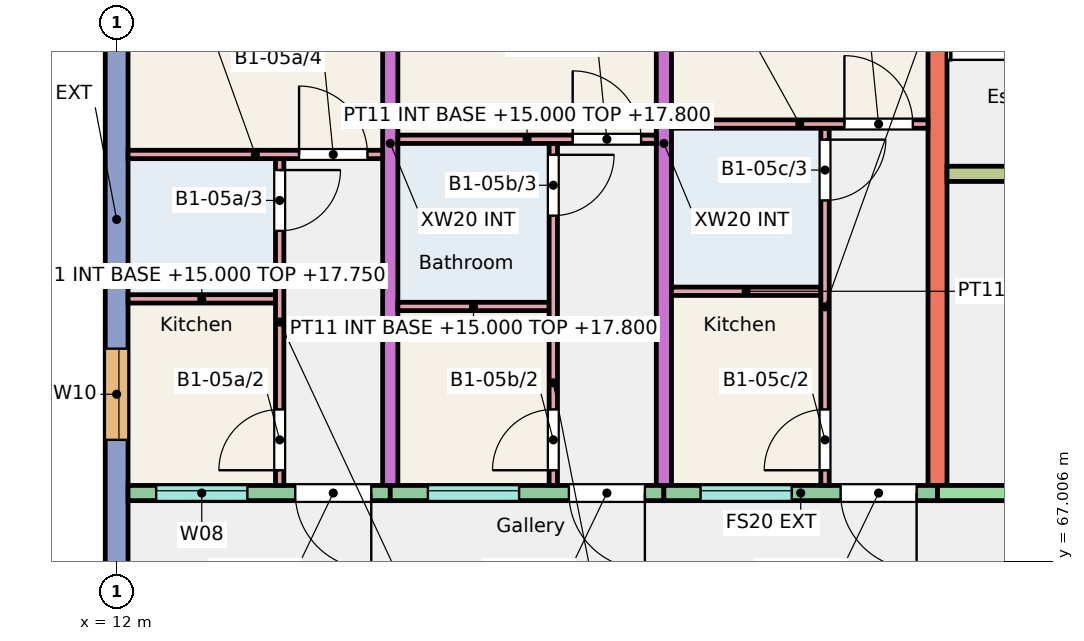
"""IFC4 building model, lengths in metres.
Left out: names, types, materials, properties, quantities, classifications, styles, units other than length and angle.
Written with IfcOpenShell. Run it as: python <this file> out.ifc"""

import sys

from ifc_helpers import new_model, si_unit, direction, frame, frame_2d, origin, place, context, subcontext, project, spatial, rectangle, extrude, element, fill, save


model = new_model("IFC4")
c1 = context("Model", 3, precision=1e-05, world=origin(), true_north=direction((0.0, 1.0)))
c2 = subcontext(c1, "Body", "Model", "MODEL_VIEW")
j1 = project(units=[si_unit("LENGTHUNIT", "METRE"), si_unit("PLANEANGLEUNIT", "RADIAN")], contexts=[c1])
p1 = place(None, origin())
s1 = spatial("IfcSite", under=j1, at=p1, CompositionType="ELEMENT")
p2 = place(p1, origin())
s2 = spatial("IfcBuilding", under=s1, at=p2, CompositionType="ELEMENT")
p3 = place(p2, frame((0.0, 0.0, 15.0)))
s3 = spatial("IfcBuildingStorey", under=s2, at=p3, CompositionType="ELEMENT", Elevation=15.0)
p4 = place(p3, frame((12.0, 66.0, 0.0), z_axis=(0.0, 0.0, 1.0), x_axis=(0.0, 1.0, 0.0)))
e1 = element("IfcWall", 1, at=p4, inside=s3, PredefinedType="SHEAR", context=c2, shape_type="SweptSolid", body=[
    extrude(rectangle(XDim=11.0, YDim=0.3, at=frame_2d((5.5, 0.0))), origin(), (0.0, 0.0, 1.0), 3.0),
])
p5 = place(p4, frame((2.6, 0.0, 0.9)))
e2 = element("IfcOpeningElement", 2, at=p5, cuts=e1, PredefinedType="OPENING", context=c2, shape_type="SweptSolid", body=[
    extrude(rectangle(XDim=1.2, YDim=1.5, at=frame_2d((0.6, 0.75))), frame((0.0, 0.16, 0.0), z_axis=(0.0, -1.0, 0.0), x_axis=(1.0, 0.0, 0.0)), (0.0, 0.0, 1.0), 0.32),
])
p6 = place(p4, frame((7.805, 0.0, 0.9)))
e3 = element("IfcOpeningElement", 3, at=p6, cuts=e1, PredefinedType="OPENING", context=c2, shape_type="SweptSolid", body=[
    extrude(rectangle(XDim=1.8, YDim=1.5, at=frame_2d((0.9, 0.75))), frame((0.0, 0.16, 0.0), z_axis=(0.0, -1.0, 0.0), x_axis=(1.0, 0.0, 0.0)), (0.0, 0.0, 1.0), 0.32),
])
for number, where, z_axis, x_axis in (
    (4, (15.6, 68.0, 0.0), (0.0, 0.0, 1.0), (0.0, 1.0, 0.0)),
    (5, (19.2, 68.0, 0.0), (0.0, 0.0, 1.0), (0.0, 1.0, 0.0)),
):
    element("IfcWall", number, at=place(p3, frame(where, z_axis=z_axis, x_axis=x_axis)), inside=s3, PredefinedType="SHEAR", context=c2, shape_type="SweptSolid", body=[
        extrude(rectangle(XDim=9.0, YDim=0.2, at=frame_2d((4.5, 0.0))), origin(), (0.0, 0.0, 1.0), 3.0),
    ])
p7 = place(p3, frame((22.8, 68.0, 0.0), z_axis=(0.0, 0.0, 1.0), x_axis=(0.0, 1.0, 0.0)))
e6 = element("IfcWall", 6, at=p7, inside=s3, PredefinedType="SHEAR", context=c2, shape_type="SweptSolid", body=[
    extrude(rectangle(XDim=9.0, YDim=0.25, at=frame_2d((4.5, 0.0))), origin(), (0.0, 0.0, 1.0), 3.0),
])
p8 = place(p3, frame((12.15, 67.9, 0.0), z_axis=(0.0, 0.0, 1.0), x_axis=(1.0, 0.0, 0.0)))
e7 = element("IfcWall", 7, at=p8, inside=s3, PredefinedType="SOLIDWALL", context=c2, shape_type="SweptSolid", body=[
    extrude(rectangle(XDim=3.45, YDim=0.2, at=frame_2d((1.725, 0.0))), origin(), (0.0, 0.0, 1.0), 3.0),
])
p9 = place(p8, frame((0.37, 0.0, 1.1)))
e8 = element("IfcOpeningElement", 8, at=p9, cuts=e7, PredefinedType="OPENING", context=c2, shape_type="SweptSolid", body=[
    extrude(rectangle(XDim=1.2, YDim=1.3, at=frame_2d((0.6, 0.65))), frame((0.0, 0.11, 0.0), z_axis=(0.0, -1.0, 0.0), x_axis=(1.0, 0.0, 0.0)), (0.0, 0.0, 1.0), 0.22),
])
p10 = place(p8, frame((2.2, 0.0, 0.0)))
e9 = element("IfcOpeningElement", 9, at=p10, cuts=e7, PredefinedType="OPENING", context=c2, shape_type="SweptSolid", body=[
    extrude(rectangle(XDim=1.0, YDim=2.1, at=frame_2d((0.5, 1.05))), frame((0.0, 0.11, 0.0), z_axis=(0.0, -1.0, 0.0), x_axis=(1.0, 0.0, 0.0)), (0.0, 0.0, 1.0), 0.22),
])
p11 = place(p3, frame((15.6, 67.9, 0.0), z_axis=(0.0, 0.0, 1.0), x_axis=(1.0, 0.0, 0.0)))
e10 = element("IfcWall", 10, at=p11, inside=s3, PredefinedType="SOLIDWALL", context=c2, shape_type="SweptSolid", body=[
    extrude(rectangle(XDim=3.6, YDim=0.2, at=frame_2d((1.8, 0.0))), origin(), (0.0, 0.0, 1.0), 3.0),
])
p12 = place(p11, frame((0.495, 0.0, 1.1)))
e11 = element("IfcOpeningElement", 11, at=p12, cuts=e10, PredefinedType="OPENING", context=c2, shape_type="SweptSolid", body=[
    extrude(rectangle(XDim=1.2, YDim=1.3, at=frame_2d((0.6, 0.65))), frame((0.0, 0.11, 0.0), z_axis=(0.0, -1.0, 0.0), x_axis=(1.0, 0.0, 0.0)), (0.0, 0.0, 1.0), 0.22),
])
p13 = place(p11, frame((2.35, 0.0, 0.0)))
e12 = element("IfcOpeningElement", 12, at=p13, cuts=e10, PredefinedType="OPENING", context=c2, shape_type="SweptSolid", body=[
    extrude(rectangle(XDim=1.0, YDim=2.1, at=frame_2d((0.5, 1.05))), frame((0.0, 0.11, 0.0), z_axis=(0.0, -1.0, 0.0), x_axis=(1.0, 0.0, 0.0)), (0.0, 0.0, 1.0), 0.22),
])
p14 = place(p3, frame((19.2, 67.9, 0.0), z_axis=(0.0, 0.0, 1.0), x_axis=(1.0, 0.0, 0.0)))
e13 = element("IfcWall", 13, at=p14, inside=s3, PredefinedType="SOLIDWALL", context=c2, shape_type="SweptSolid", body=[
    extrude(rectangle(XDim=3.6, YDim=0.2, at=frame_2d((1.8, 0.0))), origin(), (0.0, 0.0, 1.0), 3.0),
])
p15 = place(p14, frame((0.482, 0.0, 1.1)))
e14 = element("IfcOpeningElement", 14, at=p15, cuts=e13, PredefinedType="OPENING", context=c2, shape_type="SweptSolid", body=[
    extrude(rectangle(XDim=1.2, YDim=1.3, at=frame_2d((0.6, 0.65))), frame((0.0, 0.11, 0.0), z_axis=(0.0, -1.0, 0.0), x_axis=(1.0, 0.0, 0.0)), (0.0, 0.0, 1.0), 0.22),
])
p16 = place(p14, frame((2.325, 0.0, 0.0)))
e15 = element("IfcOpeningElement", 15, at=p16, cuts=e13, PredefinedType="OPENING", context=c2, shape_type="SweptSolid", body=[
    extrude(rectangle(XDim=1.0, YDim=2.1, at=frame_2d((0.5, 1.05))), frame((0.0, 0.11, 0.0), z_axis=(0.0, -1.0, 0.0), x_axis=(1.0, 0.0, 0.0)), (0.0, 0.0, 1.0), 0.22),
])
p17 = place(p3, frame((22.8, 67.9, 0.0), z_axis=(0.0, 0.0, 1.0), x_axis=(1.0, 0.0, 0.0)))
e16 = element("IfcWall", 16, at=p17, inside=s3, PredefinedType="SHEAR", context=c2, shape_type="SweptSolid", body=[
    extrude(rectangle(XDim=5.85, YDim=0.2, at=frame_2d((2.925, 0.0))), origin(), (0.0, 0.0, 1.0), 3.0),
])
p18 = place(p17, frame((2.438, 0.0, 0.0)))
e17 = element("IfcOpeningElement", 17, at=p18, cuts=e16, PredefinedType="OPENING", context=c2, shape_type="SweptSolid", body=[
    extrude(rectangle(XDim=1.1, YDim=2.1, at=frame_2d((0.55, 1.05))), frame((0.0, 0.11, 0.0), z_axis=(0.0, -1.0, 0.0), x_axis=(1.0, 0.0, 0.0)), (0.0, 0.0, 1.0), 0.22),
])
p19 = place(p3, frame((22.925, 72.1, 0.0), z_axis=(0.0, 0.0, 1.0), x_axis=(1.0, 0.0, 0.0)))
e18 = element("IfcWall", 18, at=p19, inside=s3, PredefinedType="SHEAR", context=c2, shape_type="SweptSolid", body=[
    extrude(rectangle(XDim=5.725, YDim=0.2, at=frame_2d((2.862, 0.0))), origin(), (0.0, 0.0, 1.0), 3.0),
])
p20 = place(p19, frame((0.95, 0.0, 0.0)))
e19 = element("IfcOpeningElement", 19, at=p20, cuts=e18, PredefinedType="OPENING", context=c2, shape_type="SweptSolid", body=[
    extrude(rectangle(XDim=1.0, YDim=2.1, at=frame_2d((0.5, 1.05))), frame((0.0, 0.11, 0.0), z_axis=(0.0, -1.0, 0.0), x_axis=(1.0, 0.0, 0.0)), (0.0, 0.0, 1.0), 0.22),
])
p21 = place(p19, frame((3.863, 0.0, 0.0)))
e20 = element("IfcOpeningElement", 20, at=p21, cuts=e18, PredefinedType="OPENING", context=c2, shape_type="SweptSolid", body=[
    extrude(rectangle(XDim=1.1, YDim=2.1, at=frame_2d((0.55, 1.05))), frame((0.0, 0.11, 0.0), z_axis=(0.0, -1.0, 0.0), x_axis=(1.0, 0.0, 0.0)), (0.0, 0.0, 1.0), 0.22),
])
p22 = place(p3, frame((12.15, 70.455, 0.0), z_axis=(0.0, 0.0, 1.0), x_axis=(1.0, 0.0, 0.0)))
e21 = element("IfcWall", 21, at=p22, inside=s3, PredefinedType="PARTITIONING", context=c2, shape_type="SweptSolid", body=[
    extrude(rectangle(XDim=1.94, YDim=0.11, at=frame_2d((0.97, 0.0))), origin(), (0.0, 0.0, 1.0), 2.75),
])
p23 = place(p3, frame((14.145, 68.0, 0.0), z_axis=(0.0, 0.0, 1.0), x_axis=(0.0, 1.0, 0.0)))
e22 = element("IfcWall", 22, at=p23, inside=s3, PredefinedType="PARTITIONING", context=c2, shape_type="SweptSolid", body=[
    extrude(rectangle(XDim=4.3, YDim=0.11, at=frame_2d((2.15, 0.0))), origin(), (0.0, 0.0, 1.0), 2.75),
])
p24 = place(p23, frame((0.2, 0.0, 0.0)))
e23 = element("IfcOpeningElement", 23, at=p24, cuts=e22, PredefinedType="OPENING", context=c2, shape_type="SweptSolid", body=[
    extrude(rectangle(XDim=0.8, YDim=2.1, at=frame_2d((0.4, 1.05))), frame((0.0, 0.065, 0.0), z_axis=(0.0, -1.0, 0.0), x_axis=(1.0, 0.0, 0.0)), (0.0, 0.0, 1.0), 0.13),
])
p25 = place(p23, frame((3.35, 0.0, 0.0)))
e24 = element("IfcOpeningElement", 24, at=p25, cuts=e22, PredefinedType="OPENING", context=c2, shape_type="SweptSolid", body=[
    extrude(rectangle(XDim=0.8, YDim=2.1, at=frame_2d((0.4, 1.05))), frame((0.0, 0.065, 0.0), z_axis=(0.0, -1.0, 0.0), x_axis=(1.0, 0.0, 0.0)), (0.0, 0.0, 1.0), 0.13),
])
p26 = place(p3, frame((12.15, 72.355, 0.0), z_axis=(0.0, 0.0, 1.0), x_axis=(1.0, 0.0, 0.0)))
e25 = element("IfcWall", 25, at=p26, inside=s3, PredefinedType="PARTITIONING", context=c2, shape_type="SweptSolid", body=[
    extrude(rectangle(XDim=3.35, YDim=0.11, at=frame_2d((1.675, 0.0))), origin(), (0.0, 0.0, 1.0), 2.75),
])
p27 = place(p26, frame((2.25, 0.0, 0.0)))
e26 = element("IfcOpeningElement", 26, at=p27, cuts=e25, PredefinedType="OPENING", context=c2, shape_type="SweptSolid", body=[
    extrude(rectangle(XDim=0.9, YDim=2.1, at=frame_2d((0.45, 1.05))), frame((0.0, 0.065, 0.0), z_axis=(0.0, -1.0, 0.0), x_axis=(1.0, 0.0, 0.0)), (0.0, 0.0, 1.0), 0.13),
])
p28 = place(p3, frame((15.7, 70.355, 0.0), z_axis=(0.0, 0.0, 1.0), x_axis=(1.0, 0.0, 0.0)))
e27 = element("IfcWall", 27, at=p28, inside=s3, PredefinedType="PARTITIONING", context=c2, shape_type="SweptSolid", body=[
    extrude(rectangle(XDim=1.99, YDim=0.11, at=frame_2d((0.995, 0.0))), origin(), (0.0, 0.0, 1.0), 2.8),
])
p29 = place(p3, frame((17.745, 68.0, 0.0), z_axis=(0.0, 0.0, 1.0), x_axis=(0.0, 1.0, 0.0)))
e28 = element("IfcWall", 28, at=p29, inside=s3, PredefinedType="PARTITIONING", context=c2, shape_type="SweptSolid", body=[
    extrude(rectangle(XDim=4.5, YDim=0.11, at=frame_2d((2.25, 0.0))), origin(), (0.0, 0.0, 1.0), 2.8),
])
p30 = place(p29, frame((0.2, 0.0, 0.0)))
e29 = element("IfcOpeningElement", 29, at=p30, cuts=e28, PredefinedType="OPENING", context=c2, shape_type="SweptSolid", body=[
    extrude(rectangle(XDim=0.8, YDim=2.1, at=frame_2d((0.4, 1.05))), frame((0.0, 0.065, 0.0), z_axis=(0.0, -1.0, 0.0), x_axis=(1.0, 0.0, 0.0)), (0.0, 0.0, 1.0), 0.13),
])
p31 = place(p29, frame((3.55, 0.0, 0.0)))
e30 = element("IfcOpeningElement", 30, at=p31, cuts=e28, PredefinedType="OPENING", context=c2, shape_type="SweptSolid", body=[
    extrude(rectangle(XDim=0.8, YDim=2.1, at=frame_2d((0.4, 1.05))), frame((0.0, 0.065, 0.0), z_axis=(0.0, -1.0, 0.0), x_axis=(1.0, 0.0, 0.0)), (0.0, 0.0, 1.0), 0.13),
])
p32 = place(p3, frame((15.7, 72.555, 0.0), z_axis=(0.0, 0.0, 1.0), x_axis=(1.0, 0.0, 0.0)))
e31 = element("IfcWall", 31, at=p32, inside=s3, PredefinedType="PARTITIONING", context=c2, shape_type="SweptSolid", body=[
    extrude(rectangle(XDim=3.4, YDim=0.11, at=frame_2d((1.7, 0.0))), origin(), (0.0, 0.0, 1.0), 2.8),
])
p33 = place(p32, frame((2.3, 0.0, 0.0)))
e32 = element("IfcOpeningElement", 32, at=p33, cuts=e31, PredefinedType="OPENING", context=c2, shape_type="SweptSolid", body=[
    extrude(rectangle(XDim=0.9, YDim=2.1, at=frame_2d((0.45, 1.05))), frame((0.0, 0.065, 0.0), z_axis=(0.0, -1.0, 0.0), x_axis=(1.0, 0.0, 0.0)), (0.0, 0.0, 1.0), 0.13),
])
p34 = place(p3, frame((19.3, 70.555, 0.0), z_axis=(0.0, 0.0, 1.0), x_axis=(1.0, 0.0, 0.0)))
e33 = element("IfcWall", 33, at=p34, inside=s3, PredefinedType="PARTITIONING", context=c2, shape_type="SweptSolid", body=[
    extrude(rectangle(XDim=1.965, YDim=0.11, at=frame_2d((0.982, 0.0))), origin(), (0.0, 0.0, 1.0), 2.8),
])
p35 = place(p3, frame((21.32, 68.0, 0.0), z_axis=(0.0, 0.0, 1.0), x_axis=(0.0, 1.0, 0.0)))
e34 = element("IfcWall", 34, at=p35, inside=s3, PredefinedType="PARTITIONING", context=c2, shape_type="SweptSolid", body=[
    extrude(rectangle(XDim=4.7, YDim=0.11, at=frame_2d((2.35, 0.0))), origin(), (0.0, 0.0, 1.0), 2.8),
])
p36 = place(p35, frame((0.2, 0.0, 0.0)))
e35 = element("IfcOpeningElement", 35, at=p36, cuts=e34, PredefinedType="OPENING", context=c2, shape_type="SweptSolid", body=[
    extrude(rectangle(XDim=0.8, YDim=2.1, at=frame_2d((0.4, 1.05))), frame((0.0, 0.065, 0.0), z_axis=(0.0, -1.0, 0.0), x_axis=(1.0, 0.0, 0.0)), (0.0, 0.0, 1.0), 0.13),
])
p37 = place(p35, frame((3.75, 0.0, 0.0)))
e36 = element("IfcOpeningElement", 36, at=p37, cuts=e34, PredefinedType="OPENING", context=c2, shape_type="SweptSolid", body=[
    extrude(rectangle(XDim=0.8, YDim=2.1, at=frame_2d((0.4, 1.05))), frame((0.0, 0.065, 0.0), z_axis=(0.0, -1.0, 0.0), x_axis=(1.0, 0.0, 0.0)), (0.0, 0.0, 1.0), 0.13),
])
p38 = place(p3, frame((19.3, 72.755, 0.0), z_axis=(0.0, 0.0, 1.0), x_axis=(1.0, 0.0, 0.0)))
e37 = element("IfcWall", 37, at=p38, inside=s3, PredefinedType="PARTITIONING", context=c2, shape_type="SweptSolid", body=[
    extrude(rectangle(XDim=3.375, YDim=0.11, at=frame_2d((1.688, 0.0))), origin(), (0.0, 0.0, 1.0), 2.8),
])
p39 = place(p38, frame((2.275, 0.0, 0.0)))
e38 = element("IfcOpeningElement", 38, at=p39, cuts=e37, PredefinedType="OPENING", context=c2, shape_type="SweptSolid", body=[
    extrude(rectangle(XDim=0.9, YDim=2.1, at=frame_2d((0.45, 1.05))), frame((0.0, 0.065, 0.0), z_axis=(0.0, -1.0, 0.0), x_axis=(1.0, 0.0, 0.0)), (0.0, 0.0, 1.0), 0.13),
])
p40 = place(p9, origin())
e39 = element("IfcWindow", 39, at=p40, inside=s3, PartitioningType="SINGLE_PANEL", PredefinedType="WINDOW", context=c2, shape_type="SweptSolid", body=[
    extrude(rectangle(XDim=1.2, YDim=1.3, at=frame_2d((0.6, 0.65))), frame((0.0, 0.06, 0.0), z_axis=(0.0, -1.0, 0.0), x_axis=(1.0, 0.0, 0.0)), (0.0, 0.0, 1.0), 0.06),
])
fill(e8, e39)
p41 = place(p5, origin())
e40 = element("IfcWindow", 40, at=p41, inside=s3, PartitioningType="SINGLE_PANEL", PredefinedType="WINDOW", context=c2, shape_type="SweptSolid", body=[
    extrude(rectangle(XDim=1.2, YDim=1.5, at=frame_2d((0.6, 0.75))), frame((0.0, 0.0, 0.0), z_axis=(0.0, -1.0, 0.0), x_axis=(1.0, 0.0, 0.0)), (0.0, 0.0, 1.0), 0.06),
])
fill(e2, e40)
p42 = place(p12, origin())
e41 = element("IfcWindow", 41, at=p42, inside=s3, PartitioningType="SINGLE_PANEL", PredefinedType="WINDOW", context=c2, shape_type="SweptSolid", body=[
    extrude(rectangle(XDim=1.2, YDim=1.3, at=frame_2d((0.6, 0.65))), frame((0.0, 0.06, 0.0), z_axis=(0.0, -1.0, 0.0), x_axis=(1.0, 0.0, 0.0)), (0.0, 0.0, 1.0), 0.06),
])
fill(e11, e41)
p43 = place(p15, origin())
e42 = element("IfcWindow", 42, at=p43, inside=s3, PartitioningType="SINGLE_PANEL", PredefinedType="WINDOW", context=c2, shape_type="SweptSolid", body=[
    extrude(rectangle(XDim=1.2, YDim=1.3, at=frame_2d((0.6, 0.65))), frame((0.0, 0.06, 0.0), z_axis=(0.0, -1.0, 0.0), x_axis=(1.0, 0.0, 0.0)), (0.0, 0.0, 1.0), 0.06),
])
fill(e14, e42)
p44 = place(p10, origin())
e43 = element("IfcDoor", 43, at=p44, inside=s3, OperationType="SINGLE_SWING_RIGHT", PredefinedType="DOOR", context=c2, shape_type="SweptSolid", body=[
    extrude(rectangle(XDim=1.0, YDim=2.1, at=frame_2d((0.5, 1.05))), frame((0.0, 0.025, 0.0), z_axis=(0.0, -1.0, 0.0), x_axis=(1.0, 0.0, 0.0)), (0.0, 0.0, 1.0), 0.05),
])
fill(e9, e43)
p45 = place(p24, origin())
e44 = element("IfcDoor", 44, at=p45, inside=s3, OperationType="SINGLE_SWING_LEFT", PredefinedType="DOOR", context=c2, shape_type="SweptSolid", body=[
    extrude(rectangle(XDim=0.8, YDim=2.1, at=frame_2d((0.4, 1.05))), frame((0.0, 0.025, 0.0), z_axis=(0.0, -1.0, 0.0), x_axis=(1.0, 0.0, 0.0)), (0.0, 0.0, 1.0), 0.05),
])
fill(e23, e44)
p46 = place(p25, origin())
e45 = element("IfcDoor", 45, at=p46, inside=s3, OperationType="SINGLE_SWING_RIGHT", PredefinedType="DOOR", context=c2, shape_type="SweptSolid", body=[
    extrude(rectangle(XDim=0.8, YDim=2.1, at=frame_2d((0.4, 1.05))), frame((0.0, 0.025, 0.0), z_axis=(0.0, -1.0, 0.0), x_axis=(1.0, 0.0, 0.0)), (0.0, 0.0, 1.0), 0.05),
])
fill(e24, e45)
p47 = place(p27, origin())
e46 = element("IfcDoor", 46, at=p47, inside=s3, OperationType="SINGLE_SWING_LEFT", PredefinedType="DOOR", context=c2, shape_type="SweptSolid", body=[
    extrude(rectangle(XDim=0.9, YDim=2.1, at=frame_2d((0.45, 1.05))), frame((0.0, 0.025, 0.0), z_axis=(0.0, -1.0, 0.0), x_axis=(1.0, 0.0, 0.0)), (0.0, 0.0, 1.0), 0.05),
])
fill(e26, e46)
p48 = place(p13, origin())
e47 = element("IfcDoor", 47, at=p48, inside=s3, OperationType="SINGLE_SWING_RIGHT", PredefinedType="DOOR", context=c2, shape_type="SweptSolid", body=[
    extrude(rectangle(XDim=1.0, YDim=2.1, at=frame_2d((0.5, 1.05))), frame((0.0, 0.025, 0.0), z_axis=(0.0, -1.0, 0.0), x_axis=(1.0, 0.0, 0.0)), (0.0, 0.0, 1.0), 0.05),
])
fill(e12, e47)
p49 = place(p30, origin())
e48 = element("IfcDoor", 48, at=p49, inside=s3, OperationType="SINGLE_SWING_LEFT", PredefinedType="DOOR", context=c2, shape_type="SweptSolid", body=[
    extrude(rectangle(XDim=0.8, YDim=2.1, at=frame_2d((0.4, 1.05))), frame((0.0, 0.025, 0.0), z_axis=(0.0, -1.0, 0.0), x_axis=(1.0, 0.0, 0.0)), (0.0, 0.0, 1.0), 0.05),
])
fill(e29, e48)
p50 = place(p31, origin())
e49 = element("IfcDoor", 49, at=p50, inside=s3, OperationType="SINGLE_SWING_RIGHT", PredefinedType="DOOR", context=c2, shape_type="SweptSolid", body=[
    extrude(rectangle(XDim=0.8, YDim=2.1, at=frame_2d((0.4, 1.05))), frame((0.0, 0.025, 0.0), z_axis=(0.0, -1.0, 0.0), x_axis=(1.0, 0.0, 0.0)), (0.0, 0.0, 1.0), 0.05),
])
fill(e30, e49)
p51 = place(p33, origin())
e50 = element("IfcDoor", 50, at=p51, inside=s3, OperationType="SINGLE_SWING_LEFT", PredefinedType="DOOR", context=c2, shape_type="SweptSolid", body=[
    extrude(rectangle(XDim=0.9, YDim=2.1, at=frame_2d((0.45, 1.05))), frame((0.0, 0.025, 0.0), z_axis=(0.0, -1.0, 0.0), x_axis=(1.0, 0.0, 0.0)), (0.0, 0.0, 1.0), 0.05),
])
fill(e32, e50)
p52 = place(p16, origin())
e51 = element("IfcDoor", 51, at=p52, inside=s3, OperationType="SINGLE_SWING_RIGHT", PredefinedType="DOOR", context=c2, shape_type="SweptSolid", body=[
    extrude(rectangle(XDim=1.0, YDim=2.1, at=frame_2d((0.5, 1.05))), frame((0.0, 0.025, 0.0), z_axis=(0.0, -1.0, 0.0), x_axis=(1.0, 0.0, 0.0)), (0.0, 0.0, 1.0), 0.05),
])
fill(e15, e51)
p53 = place(p36, origin())
e52 = element("IfcDoor", 52, at=p53, inside=s3, OperationType="SINGLE_SWING_LEFT", PredefinedType="DOOR", context=c2, shape_type="SweptSolid", body=[
    extrude(rectangle(XDim=0.8, YDim=2.1, at=frame_2d((0.4, 1.05))), frame((0.0, 0.025, 0.0), z_axis=(0.0, -1.0, 0.0), x_axis=(1.0, 0.0, 0.0)), (0.0, 0.0, 1.0), 0.05),
])
fill(e35, e52)
p54 = place(p37, origin())
e53 = element("IfcDoor", 53, at=p54, inside=s3, OperationType="SINGLE_SWING_RIGHT", PredefinedType="DOOR", context=c2, shape_type="SweptSolid", body=[
    extrude(rectangle(XDim=0.8, YDim=2.1, at=frame_2d((0.4, 1.05))), frame((0.0, 0.025, 0.0), z_axis=(0.0, -1.0, 0.0), x_axis=(1.0, 0.0, 0.0)), (0.0, 0.0, 1.0), 0.05),
])
fill(e36, e53)
p55 = place(p39, origin())
e54 = element("IfcDoor", 54, at=p55, inside=s3, OperationType="SINGLE_SWING_LEFT", PredefinedType="DOOR", context=c2, shape_type="SweptSolid", body=[
    extrude(rectangle(XDim=0.9, YDim=2.1, at=frame_2d((0.45, 1.05))), frame((0.0, 0.025, 0.0), z_axis=(0.0, -1.0, 0.0), x_axis=(1.0, 0.0, 0.0)), (0.0, 0.0, 1.0), 0.05),
])
fill(e38, e54)
save(model, sys.argv[1])
